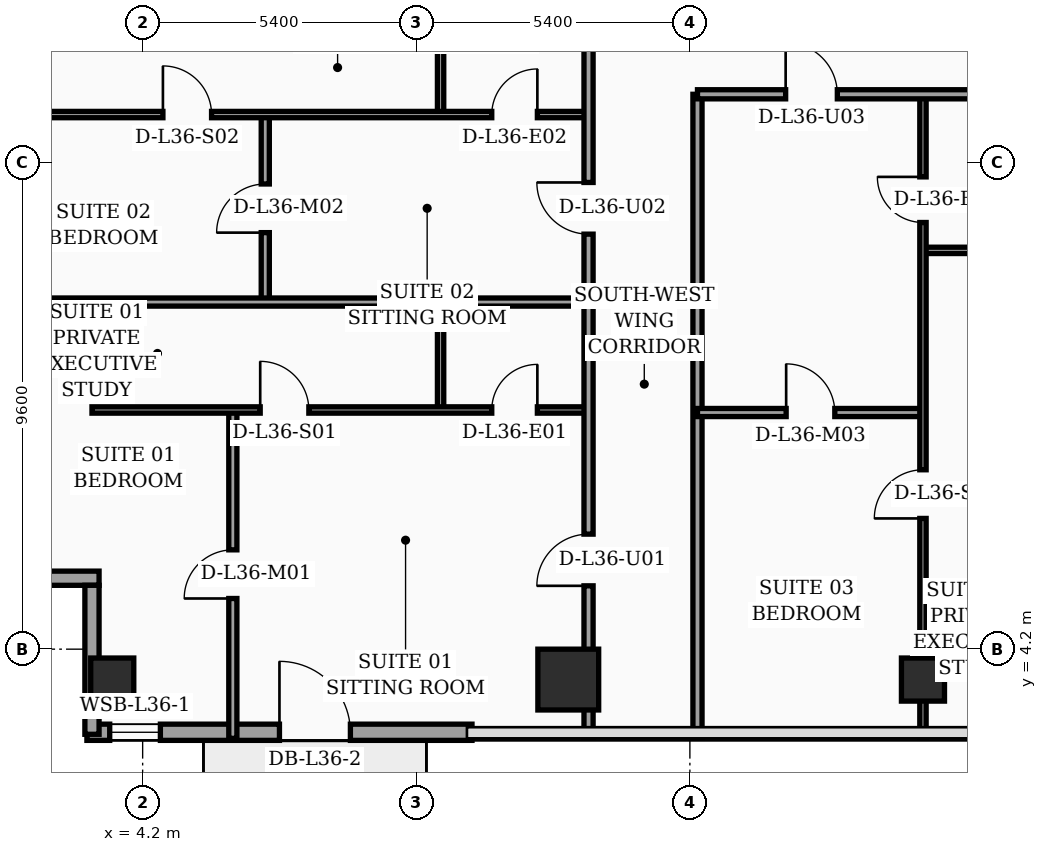
"""IFC4 building model, lengths in metres.
Left out: names, types, materials, properties, quantities, classifications, styles, units other than length and angle.
Written with IfcOpenShell. Run it as: python <this file> out.ifc"""

import sys

from ifc_helpers import new_model, si_unit, direction, frame, frame_2d, origin, origin_2d, place, context, subcontext, project, spatial, rectangle, hollow_rectangle, extrude, element, fill, save


model = new_model("IFC4")
c1 = context("Model", 3, precision=1e-05, world=origin(), true_north=direction((0.0, 1.0)))
c2 = subcontext(c1, "Body", "Model", "MODEL_VIEW")
j1 = project(units=[si_unit("LENGTHUNIT", "METRE"), si_unit("PLANEANGLEUNIT", "RADIAN")], contexts=[c1])
p1 = place(None, origin())
s1 = spatial("IfcSite", under=j1, at=p1, CompositionType="ELEMENT")
p2 = place(p1, origin())
s2 = spatial("IfcBuilding", under=s1, at=p2, CompositionType="ELEMENT")
p3 = place(p2, frame((0.0, 0.0, 148.5)))
s3 = spatial("IfcBuildingStorey", under=s2, at=p3, CompositionType="ELEMENT", Elevation=148.5)
p4 = place(p3, frame((3.6, 3.6, 0.0), z_axis=(0.0, 0.0, 1.0), x_axis=(1.0, 0.0, 0.0)))
e1 = element("IfcColumn", 1, at=p4, inside=s3, PredefinedType="COLUMN", context=c2, shape_type="SweptSolid", body=[
    extrude(hollow_rectangle(XDim=0.85, YDim=0.85, WallThickness=0.036, at=origin_2d()), origin(), (0.0, 0.0, 1.0), 3.56),
])
p5 = place(p3, frame((12.6, 3.6, 0.0), z_axis=(0.0, 0.0, 1.0), x_axis=(1.0, 0.0, 0.0)))
e2 = element("IfcColumn", 2, at=p5, inside=s3, PredefinedType="COLUMN", context=c2, shape_type="SweptSolid", body=[
    extrude(rectangle(XDim=1.2, YDim=1.2, at=origin_2d()), origin(), (0.0, 0.0, 1.0), 3.56),
])
p6 = place(p3, frame((19.6, 3.6, 0.0), z_axis=(0.0, 0.0, 1.0), x_axis=(1.0, 0.0, 0.0)))
e3 = element("IfcColumn", 3, at=p6, inside=s3, PredefinedType="COLUMN", context=c2, shape_type="SweptSolid", body=[
    extrude(hollow_rectangle(XDim=0.85, YDim=0.85, WallThickness=0.036, at=origin_2d()), origin(), (0.0, 0.0, 1.0), 3.56),
])
p7 = place(p3, frame((3.1, 2.56, 0.0), z_axis=(0.0, 0.0, 1.0), x_axis=(1.0, 0.0, 0.0)))
e4 = element("IfcWall", 4, at=p7, inside=s3, PredefinedType="SOLIDWALL", context=c2, shape_type="SweptSolid", body=[
    extrude(rectangle(XDim=7.6, YDim=0.32, at=frame_2d((3.8, 0.0))), origin(), (0.0, 0.0, 1.0), 3.56),
])
p8 = place(p7, frame((0.45, 0.0, 0.75)))
e5 = element("IfcOpeningElement", 5, at=p8, cuts=e4, PredefinedType="OPENING", context=c2, shape_type="SweptSolid", body=[
    extrude(rectangle(XDim=1.0, YDim=1.6, at=frame_2d((0.5, 0.8))), frame((0.0, 0.17, 0.0), z_axis=(0.0, -1.0, 0.0), x_axis=(1.0, 0.0, 0.0)), (0.0, 0.0, 1.0), 0.34),
])
p9 = place(p7, frame((3.8, 0.0, 0.0)))
e6 = element("IfcOpeningElement", 6, at=p9, cuts=e4, PredefinedType="OPENING", context=c2, shape_type="SweptSolid", body=[
    extrude(rectangle(XDim=1.4, YDim=2.25, at=frame_2d((0.7, 1.125))), frame((0.0, 0.17, 0.0), z_axis=(0.0, -1.0, 0.0), x_axis=(1.0, 0.0, 0.0)), (0.0, 0.0, 1.0), 0.34),
])
p10 = place(p3, frame((0.12, 5.6, 0.0), z_axis=(0.0, 0.0, 1.0), x_axis=(1.0, 0.0, 0.0)))
e7 = element("IfcWall", 7, at=p10, inside=s3, PredefinedType="SOLIDWALL", context=c2, shape_type="SweptSolid", body=[
    extrude(rectangle(XDim=3.22, YDim=0.28, at=frame_2d((1.61, 0.0))), origin(), (0.0, 0.0, 1.0), 2.94),
])
p11 = place(p3, frame((3.2, 5.46, 0.0), z_axis=(0.0, 0.0, 1.0), x_axis=(0.0, -1.0, 0.0)))
e8 = element("IfcWall", 8, at=p11, inside=s3, PredefinedType="SOLIDWALL", context=c2, shape_type="SweptSolid", body=[
    extrude(rectangle(XDim=2.94, YDim=0.28, at=frame_2d((1.47, 0.0))), origin(), (0.0, 0.0, 1.0), 2.94),
])
p12 = place(p3, frame((10.08, 8.92, 0.0), z_axis=(0.0, 0.0, 1.0), x_axis=(0.0, 1.0, 0.0)))
e9 = element("IfcWall", 9, at=p12, inside=s3, PredefinedType="PARTITIONING", context=c2, shape_type="SweptSolid", body=[
    extrude(rectangle(XDim=2.13, YDim=0.125, at=frame_2d((1.065, 0.0))), origin(), (0.0, 0.0, 1.0), 3.09),
])
p13 = place(p3, frame((5.98, 2.44, 0.0), z_axis=(0.0, 0.0, 1.0), x_axis=(0.0, 1.0, 0.0)))
e10 = element("IfcWall", 10, at=p13, inside=s3, PredefinedType="PARTITIONING", context=c2, shape_type="SweptSolid", body=[
    extrude(rectangle(XDim=6.48, YDim=0.16, at=frame_2d((3.24, 0.0))), origin(), (0.0, 0.0, 1.0), 3.04),
])
p14 = place(p13, frame((2.76, 0.0, 0.0)))
e11 = element("IfcOpeningElement", 11, at=p14, cuts=e10, PredefinedType="OPENING", context=c2, shape_type="SweptSolid", body=[
    extrude(rectangle(XDim=0.96, YDim=2.2, at=frame_2d((0.48, 1.1))), frame((0.0, 0.09, 0.0), z_axis=(0.0, -1.0, 0.0), x_axis=(1.0, 0.0, 0.0)), (0.0, 0.0, 1.0), 0.18),
])
p15 = place(p3, frame((3.2, 8.92, 0.0), z_axis=(0.0, 0.0, 1.0), x_axis=(1.0, 0.0, 0.0)))
e12 = element("IfcWall", 12, at=p15, inside=s3, PredefinedType="PARTITIONING", context=c2, shape_type="SweptSolid", body=[
    extrude(rectangle(XDim=9.8, YDim=0.125, at=frame_2d((4.9, 0.0))), origin(), (0.0, 0.0, 1.0), 2.94),
])
p16 = place(p15, frame((3.32, 0.0, 0.0)))
e13 = element("IfcOpeningElement", 13, at=p16, cuts=e12, PredefinedType="OPENING", context=c2, shape_type="SweptSolid", body=[
    extrude(rectangle(XDim=0.96, YDim=2.2, at=frame_2d((0.48, 1.1))), frame((0.0, 0.073, 0.0), z_axis=(0.0, -1.0, 0.0), x_axis=(1.0, 0.0, 0.0)), (0.0, 0.0, 1.0), 0.145),
])
p17 = place(p15, frame((7.89, 0.0, 0.0)))
e14 = element("IfcOpeningElement", 14, at=p17, cuts=e12, PredefinedType="OPENING", context=c2, shape_type="SweptSolid", body=[
    extrude(rectangle(XDim=0.9, YDim=2.15, at=frame_2d((0.45, 1.075))), frame((0.0, 0.073, 0.0), z_axis=(0.0, -1.0, 0.0), x_axis=(1.0, 0.0, 0.0)), (0.0, 0.0, 1.0), 0.145),
])
p18 = place(p3, frame((10.08, 14.75, 0.0), z_axis=(0.0, 0.0, 1.0), x_axis=(0.0, 1.0, 0.0)))
e15 = element("IfcWall", 15, at=p18, inside=s3, PredefinedType="PARTITIONING", context=c2, shape_type="SweptSolid", body=[
    extrude(rectangle(XDim=2.05, YDim=0.125, at=frame_2d((1.025, 0.0))), origin(), (0.0, 0.0, 1.0), 3.56),
])
p19 = place(p3, frame((6.62, 11.05, 0.0), z_axis=(0.0, 0.0, 1.0), x_axis=(0.0, 1.0, 0.0)))
e16 = element("IfcWall", 16, at=p19, inside=s3, PredefinedType="PARTITIONING", context=c2, shape_type="SweptSolid", body=[
    extrude(rectangle(XDim=3.7, YDim=0.16, at=frame_2d((1.85, 0.0))), origin(), (0.0, 0.0, 1.0), 3.56),
])
p20 = place(p19, frame((1.37, 0.0, 0.0)))
e17 = element("IfcOpeningElement", 17, at=p20, cuts=e16, PredefinedType="OPENING", context=c2, shape_type="SweptSolid", body=[
    extrude(rectangle(XDim=0.96, YDim=2.2, at=frame_2d((0.48, 1.1))), frame((0.0, 0.09, 0.0), z_axis=(0.0, -1.0, 0.0), x_axis=(1.0, 0.0, 0.0)), (0.0, 0.0, 1.0), 0.18),
])
p21 = place(p3, frame((0.08, 14.75, 0.0), z_axis=(0.0, 0.0, 1.0), x_axis=(1.0, 0.0, 0.0)))
e18 = element("IfcWall", 18, at=p21, inside=s3, PredefinedType="PARTITIONING", context=c2, shape_type="SweptSolid", body=[
    extrude(rectangle(XDim=12.92, YDim=0.125, at=frame_2d((6.46, 0.0))), origin(), (0.0, 0.0, 1.0), 2.94),
])
p22 = place(p21, frame((4.52, 0.0, 0.0)))
e19 = element("IfcOpeningElement", 19, at=p22, cuts=e18, PredefinedType="OPENING", context=c2, shape_type="SweptSolid", body=[
    extrude(rectangle(XDim=0.96, YDim=2.2, at=frame_2d((0.48, 1.1))), frame((0.0, 0.073, 0.0), z_axis=(0.0, -1.0, 0.0), x_axis=(1.0, 0.0, 0.0)), (0.0, 0.0, 1.0), 0.145),
])
p23 = place(p21, frame((11.01, 0.0, 0.0)))
e20 = element("IfcOpeningElement", 20, at=p23, cuts=e18, PredefinedType="OPENING", context=c2, shape_type="SweptSolid", body=[
    extrude(rectangle(XDim=0.9, YDim=2.15, at=frame_2d((0.45, 1.075))), frame((0.0, 0.073, 0.0), z_axis=(0.0, -1.0, 0.0), x_axis=(1.0, 0.0, 0.0)), (0.0, 0.0, 1.0), 0.145),
])
p24 = place(p3, frame((0.08, 11.05, 0.0), z_axis=(0.0, 0.0, 1.0), x_axis=(1.0, 0.0, 0.0)))
e21 = element("IfcWall", 21, at=p24, inside=s3, PredefinedType="PARTITIONING", context=c2, shape_type="SweptSolid", body=[
    extrude(rectangle(XDim=12.92, YDim=0.16, at=frame_2d((6.46, 0.0))), origin(), (0.0, 0.0, 1.0), 2.94),
])
p25 = place(p3, frame((13.0, 2.44, 0.0), z_axis=(0.0, 0.0, 1.0), x_axis=(0.0, 1.0, 0.0)))
e22 = element("IfcWall", 22, at=p25, inside=s3, PredefinedType="PARTITIONING", context=c2, shape_type="SweptSolid", body=[
    extrude(rectangle(XDim=14.36, YDim=0.18, at=frame_2d((7.18, 0.0))), origin(), (0.0, 0.0, 1.0), 2.94),
])
p26 = place(p25, frame((3.01, 0.0, 0.0)))
e23 = element("IfcOpeningElement", 23, at=p26, cuts=e22, PredefinedType="OPENING", context=c2, shape_type="SweptSolid", body=[
    extrude(rectangle(XDim=1.02, YDim=2.2, at=frame_2d((0.51, 1.1))), frame((0.0, 0.1, 0.0), z_axis=(0.0, -1.0, 0.0), x_axis=(1.0, 0.0, 0.0)), (0.0, 0.0, 1.0), 0.2),
])
p27 = place(p25, frame((9.95, 0.0, 0.0)))
e24 = element("IfcOpeningElement", 24, at=p27, cuts=e22, PredefinedType="OPENING", context=c2, shape_type="SweptSolid", body=[
    extrude(rectangle(XDim=1.02, YDim=2.2, at=frame_2d((0.51, 1.1))), frame((0.0, 0.1, 0.0), z_axis=(0.0, -1.0, 0.0), x_axis=(1.0, 0.0, 0.0)), (0.0, 0.0, 1.0), 0.2),
])
p28 = place(p3, frame((15.15, 2.44, 0.0), z_axis=(0.0, 0.0, 1.0), x_axis=(0.0, 1.0, 0.0)))
e25 = element("IfcWall", 25, at=p28, inside=s3, PredefinedType="PARTITIONING", context=c2, shape_type="SweptSolid", body=[
    extrude(rectangle(XDim=12.71, YDim=0.18, at=frame_2d((6.355, 0.0))), origin(), (0.0, 0.0, 1.0), 3.04),
])
p29 = place(p3, frame((19.6, 12.07, 0.0), z_axis=(0.0, 0.0, 1.0), x_axis=(1.0, 0.0, 0.0)))
e26 = element("IfcWall", 26, at=p29, inside=s3, PredefinedType="PARTITIONING", context=c2, shape_type="SweptSolid", body=[
    extrude(rectangle(XDim=2.0, YDim=0.125, at=frame_2d((1.0, 0.0))), origin(), (0.0, 0.0, 1.0), 3.56),
])
p30 = place(p3, frame((15.15, 8.87, 0.0), z_axis=(0.0, 0.0, 1.0), x_axis=(1.0, 0.0, 0.0)))
e27 = element("IfcWall", 27, at=p30, inside=s3, PredefinedType="PARTITIONING", context=c2, shape_type="SweptSolid", body=[
    extrude(rectangle(XDim=4.45, YDim=0.16, at=frame_2d((2.225, 0.0))), origin(), (0.0, 0.0, 1.0), 3.56),
])
p31 = place(p30, frame((1.75, 0.0, 0.0)))
e28 = element("IfcOpeningElement", 28, at=p31, cuts=e27, PredefinedType="OPENING", context=c2, shape_type="SweptSolid", body=[
    extrude(rectangle(XDim=0.96, YDim=2.2, at=frame_2d((0.48, 1.1))), frame((0.0, 0.09, 0.0), z_axis=(0.0, -1.0, 0.0), x_axis=(1.0, 0.0, 0.0)), (0.0, 0.0, 1.0), 0.18),
])
p32 = place(p3, frame((19.6, 2.44, 0.0), z_axis=(0.0, 0.0, 1.0), x_axis=(0.0, 1.0, 0.0)))
e29 = element("IfcWall", 29, at=p32, inside=s3, PredefinedType="PARTITIONING", context=c2, shape_type="SweptSolid", body=[
    extrude(rectangle(XDim=12.71, YDim=0.125, at=frame_2d((6.355, 0.0))), origin(), (0.0, 0.0, 1.0), 2.49),
])
p33 = place(p32, frame((4.34, 0.0, 0.0)))
e30 = element("IfcOpeningElement", 30, at=p33, cuts=e29, PredefinedType="OPENING", context=c2, shape_type="SweptSolid", body=[
    extrude(rectangle(XDim=0.96, YDim=2.2, at=frame_2d((0.48, 1.1))), frame((0.0, 0.073, 0.0), z_axis=(0.0, -1.0, 0.0), x_axis=(1.0, 0.0, 0.0)), (0.0, 0.0, 1.0), 0.145),
])
p34 = place(p32, frame((10.18, 0.0, 0.0)))
e31 = element("IfcOpeningElement", 31, at=p34, cuts=e29, PredefinedType="OPENING", context=c2, shape_type="SweptSolid", body=[
    extrude(rectangle(XDim=0.9, YDim=2.15, at=frame_2d((0.45, 1.075))), frame((0.0, 0.073, 0.0), z_axis=(0.0, -1.0, 0.0), x_axis=(1.0, 0.0, 0.0)), (0.0, 0.0, 1.0), 0.145),
])
p35 = place(p3, frame((15.15, 15.15, 0.0), z_axis=(0.0, 0.0, 1.0), x_axis=(1.0, 0.0, 0.0)))
e32 = element("IfcWall", 32, at=p35, inside=s3, PredefinedType="PARTITIONING", context=c2, shape_type="SweptSolid", body=[
    extrude(rectangle(XDim=6.45, YDim=0.18, at=frame_2d((3.225, 0.0))), origin(), (0.0, 0.0, 1.0), 2.49),
])
p36 = place(p35, frame((1.74, 0.0, 0.0)))
e33 = element("IfcOpeningElement", 33, at=p36, cuts=e32, PredefinedType="OPENING", context=c2, shape_type="SweptSolid", body=[
    extrude(rectangle(XDim=1.02, YDim=2.2, at=frame_2d((0.51, 1.1))), frame((0.0, 0.1, 0.0), z_axis=(0.0, -1.0, 0.0), x_axis=(1.0, 0.0, 0.0)), (0.0, 0.0, 1.0), 0.2),
])
p37 = place(p8, origin())
e34 = element("IfcWindow", 34, at=p37, inside=s3, PartitioningType="SINGLE_PANEL", PredefinedType="WINDOW", context=c2, shape_type="SweptSolid", body=[
    extrude(rectangle(XDim=1.0, YDim=1.6, at=frame_2d((0.5, 0.8))), frame((0.0, 0.03, 0.0), z_axis=(0.0, -1.0, 0.0), x_axis=(1.0, 0.0, 0.0)), (0.0, 0.0, 1.0), 0.06),
])
fill(e5, e34)
p38 = place(p9, origin())
e35 = element("IfcDoor", 35, at=p38, inside=s3, OperationType="SINGLE_SWING_LEFT", PredefinedType="DOOR", context=c2, shape_type="SweptSolid", body=[
    extrude(rectangle(XDim=1.4, YDim=2.25, at=frame_2d((0.7, 1.125))), frame((0.0, 0.025, 0.0), z_axis=(0.0, -1.0, 0.0), x_axis=(1.0, 0.0, 0.0)), (0.0, 0.0, 1.0), 0.05),
])
fill(e6, e35)
p39 = place(p14, origin())
e36 = element("IfcDoor", 36, at=p39, inside=s3, OperationType="SINGLE_SWING_LEFT", PredefinedType="DOOR", context=c2, shape_type="SweptSolid", body=[
    extrude(rectangle(XDim=0.96, YDim=2.2, at=frame_2d((0.48, 1.1))), frame((0.0, 0.025, 0.0), z_axis=(0.0, -1.0, 0.0), x_axis=(1.0, 0.0, 0.0)), (0.0, 0.0, 1.0), 0.05),
])
fill(e11, e36)
p40 = place(p16, origin())
e37 = element("IfcDoor", 37, at=p40, inside=s3, OperationType="SINGLE_SWING_LEFT", PredefinedType="DOOR", context=c2, shape_type="SweptSolid", body=[
    extrude(rectangle(XDim=0.96, YDim=2.2, at=frame_2d((0.48, 1.1))), frame((0.0, 0.025, 0.0), z_axis=(0.0, -1.0, 0.0), x_axis=(1.0, 0.0, 0.0)), (0.0, 0.0, 1.0), 0.05),
])
fill(e13, e37)
p41 = place(p17, origin())
e38 = element("IfcDoor", 38, at=p41, inside=s3, OperationType="SINGLE_SWING_RIGHT", PredefinedType="DOOR", context=c2, shape_type="SweptSolid", body=[
    extrude(rectangle(XDim=0.9, YDim=2.15, at=frame_2d((0.45, 1.075))), frame((0.0, 0.025, 0.0), z_axis=(0.0, -1.0, 0.0), x_axis=(1.0, 0.0, 0.0)), (0.0, 0.0, 1.0), 0.05),
])
fill(e14, e38)
p42 = place(p20, origin())
e39 = element("IfcDoor", 39, at=p42, inside=s3, OperationType="SINGLE_SWING_LEFT", PredefinedType="DOOR", context=c2, shape_type="SweptSolid", body=[
    extrude(rectangle(XDim=0.96, YDim=2.2, at=frame_2d((0.48, 1.1))), frame((0.0, 0.025, 0.0), z_axis=(0.0, -1.0, 0.0), x_axis=(1.0, 0.0, 0.0)), (0.0, 0.0, 1.0), 0.05),
])
fill(e17, e39)
p43 = place(p22, origin())
e40 = element("IfcDoor", 40, at=p43, inside=s3, OperationType="SINGLE_SWING_LEFT", PredefinedType="DOOR", context=c2, shape_type="SweptSolid", body=[
    extrude(rectangle(XDim=0.96, YDim=2.2, at=frame_2d((0.48, 1.1))), frame((0.0, 0.025, 0.0), z_axis=(0.0, -1.0, 0.0), x_axis=(1.0, 0.0, 0.0)), (0.0, 0.0, 1.0), 0.05),
])
fill(e19, e40)
p44 = place(p23, origin())
e41 = element("IfcDoor", 41, at=p44, inside=s3, OperationType="SINGLE_SWING_RIGHT", PredefinedType="DOOR", context=c2, shape_type="SweptSolid", body=[
    extrude(rectangle(XDim=0.9, YDim=2.15, at=frame_2d((0.45, 1.075))), frame((0.0, 0.025, 0.0), z_axis=(0.0, -1.0, 0.0), x_axis=(1.0, 0.0, 0.0)), (0.0, 0.0, 1.0), 0.05),
])
fill(e20, e41)
p45 = place(p26, origin())
e42 = element("IfcDoor", 42, at=p45, inside=s3, OperationType="SINGLE_SWING_LEFT", PredefinedType="DOOR", context=c2, shape_type="SweptSolid", body=[
    extrude(rectangle(XDim=1.02, YDim=2.2, at=frame_2d((0.51, 1.1))), frame((0.0, 0.025, 0.0), z_axis=(0.0, -1.0, 0.0), x_axis=(1.0, 0.0, 0.0)), (0.0, 0.0, 1.0), 0.05),
])
fill(e23, e42)
p46 = place(p27, origin())
e43 = element("IfcDoor", 43, at=p46, inside=s3, OperationType="SINGLE_SWING_RIGHT", PredefinedType="DOOR", context=c2, shape_type="SweptSolid", body=[
    extrude(rectangle(XDim=1.02, YDim=2.2, at=frame_2d((0.51, 1.1))), frame((0.0, 0.025, 0.0), z_axis=(0.0, -1.0, 0.0), x_axis=(1.0, 0.0, 0.0)), (0.0, 0.0, 1.0), 0.05),
])
fill(e24, e43)
p47 = place(p31, origin())
e44 = element("IfcDoor", 44, at=p47, inside=s3, OperationType="SINGLE_SWING_LEFT", PredefinedType="DOOR", context=c2, shape_type="SweptSolid", body=[
    extrude(rectangle(XDim=0.96, YDim=2.2, at=frame_2d((0.48, 1.1))), frame((0.0, 0.025, 0.0), z_axis=(0.0, -1.0, 0.0), x_axis=(1.0, 0.0, 0.0)), (0.0, 0.0, 1.0), 0.05),
])
fill(e28, e44)
p48 = place(p33, origin())
e45 = element("IfcDoor", 45, at=p48, inside=s3, OperationType="SINGLE_SWING_LEFT", PredefinedType="DOOR", context=c2, shape_type="SweptSolid", body=[
    extrude(rectangle(XDim=0.96, YDim=2.2, at=frame_2d((0.48, 1.1))), frame((0.0, 0.025, 0.0), z_axis=(0.0, -1.0, 0.0), x_axis=(1.0, 0.0, 0.0)), (0.0, 0.0, 1.0), 0.05),
])
fill(e30, e45)
p49 = place(p34, origin())
e46 = element("IfcDoor", 46, at=p49, inside=s3, OperationType="SINGLE_SWING_RIGHT", PredefinedType="DOOR", context=c2, shape_type="SweptSolid", body=[
    extrude(rectangle(XDim=0.9, YDim=2.15, at=frame_2d((0.45, 1.075))), frame((0.0, 0.025, 0.0), z_axis=(0.0, -1.0, 0.0), x_axis=(1.0, 0.0, 0.0)), (0.0, 0.0, 1.0), 0.05),
])
fill(e31, e46)
p50 = place(p36, origin())
e47 = element("IfcDoor", 47, at=p50, inside=s3, OperationType="SINGLE_SWING_LEFT", PredefinedType="DOOR", context=c2, shape_type="SweptSolid", body=[
    extrude(rectangle(XDim=1.02, YDim=2.2, at=frame_2d((0.51, 1.1))), frame((0.0, 0.025, 0.0), z_axis=(0.0, -1.0, 0.0), x_axis=(1.0, 0.0, 0.0)), (0.0, 0.0, 1.0), 0.05),
])
fill(e33, e47)
save(model, sys.argv[1])
